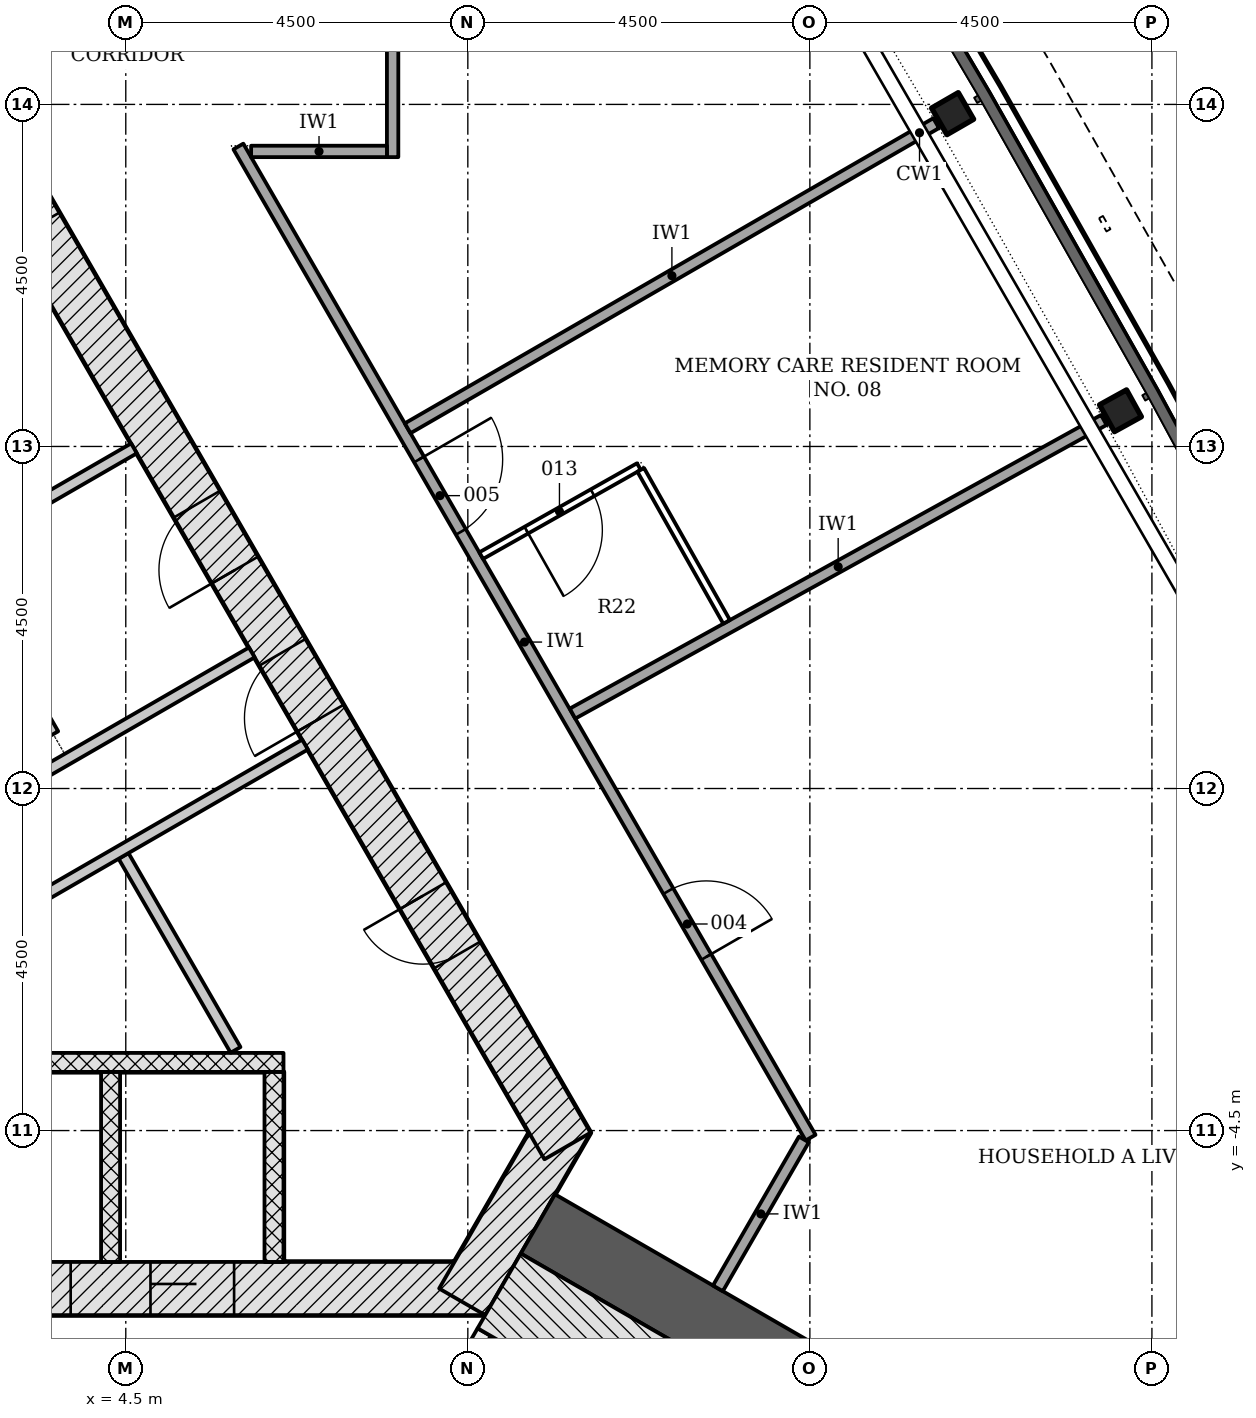
"""IFC4 building model, lengths in metres.
Left out: names, types, materials, properties, quantities, classifications, styles, units other than length and angle.
Written with IfcOpenShell. Run it as: python <this file> out.ifc"""

import sys

from ifc_helpers import new_model, si_unit, direction, frame, frame_2d, origin, origin_2d, place, context, subcontext, project, spatial, rectangle, i_section, extrude, element, fill, save


model = new_model("IFC4")
c1 = context("Model", 3, precision=1e-05, world=origin(), true_north=direction((0.0, 1.0)))
c2 = subcontext(c1, "Body", "Model", "MODEL_VIEW")
j1 = project(units=[si_unit("LENGTHUNIT", "METRE"), si_unit("PLANEANGLEUNIT", "RADIAN")], contexts=[c1])
p1 = place(None, origin())
s1 = spatial("IfcSite", under=j1, at=p1, CompositionType="ELEMENT")
p2 = place(p1, origin())
s2 = spatial("IfcBuilding", under=s1, at=p2, CompositionType="ELEMENT")
p3 = place(p2, frame((0.0, 0.0, 34.8)))
s3 = spatial("IfcBuildingStorey", under=s2, at=p3, CompositionType="ELEMENT", Elevation=34.8)
p4 = place(p3, frame((-9.229, -6.578, -0.2), z_axis=(0.0, 0.0, 1.0), x_axis=(1.0, 0.0, 0.0)))
e1 = element("IfcWall", 1, at=p4, inside=s3, PredefinedType="SHEAR", context=c2, shape_type="SweptSolid", body=[
    extrude(rectangle(XDim=18.458, YDim=0.7, at=frame_2d((9.229, 0.0))), origin(), (0.0, 0.0, 1.0), 3.6),
])
p5 = place(p4, frame((3.304, 0.0, 0.2)))
e2 = element("IfcOpeningElement", 2, at=p5, cuts=e1, PredefinedType="OPENING", context=c2, shape_type="SweptSolid", body=[
    extrude(rectangle(XDim=1.1, YDim=2.1, at=frame_2d((0.55, 1.05))), frame((0.0, 0.36, 0.0), z_axis=(0.0, -1.0, 0.0), x_axis=(1.0, 0.0, 0.0)), (0.0, 0.0, 1.0), 0.72),
])
p6 = place(p4, frame((5.454, 0.0, 0.2)))
e3 = element("IfcOpeningElement", 3, at=p6, cuts=e1, PredefinedType="OPENING", context=c2, shape_type="SweptSolid", body=[
    extrude(rectangle(XDim=1.1, YDim=2.1, at=frame_2d((0.55, 1.05))), frame((0.0, 0.36, 0.0), z_axis=(0.0, -1.0, 0.0), x_axis=(1.0, 0.0, 0.0)), (0.0, 0.0, 1.0), 0.72),
])
p7 = place(p4, frame((7.604, 0.0, 0.2)))
e4 = element("IfcOpeningElement", 4, at=p7, cuts=e1, PredefinedType="OPENING", context=c2, shape_type="SweptSolid", body=[
    extrude(rectangle(XDim=1.1, YDim=2.1, at=frame_2d((0.55, 1.05))), frame((0.0, 0.36, 0.0), z_axis=(0.0, -1.0, 0.0), x_axis=(1.0, 0.0, 0.0)), (0.0, 0.0, 1.0), 0.72),
])
p8 = place(p4, frame((9.754, 0.0, 0.2)))
e5 = element("IfcOpeningElement", 5, at=p8, cuts=e1, PredefinedType="OPENING", context=c2, shape_type="SweptSolid", body=[
    extrude(rectangle(XDim=1.1, YDim=2.1, at=frame_2d((0.55, 1.05))), frame((0.0, 0.36, 0.0), z_axis=(0.0, -1.0, 0.0), x_axis=(1.0, 0.0, 0.0)), (0.0, 0.0, 1.0), 0.72),
])
p9 = place(p4, frame((11.904, 0.0, 0.2)))
e6 = element("IfcOpeningElement", 6, at=p9, cuts=e1, PredefinedType="OPENING", context=c2, shape_type="SweptSolid", body=[
    extrude(rectangle(XDim=1.1, YDim=2.1, at=frame_2d((0.55, 1.05))), frame((0.0, 0.36, 0.0), z_axis=(0.0, -1.0, 0.0), x_axis=(1.0, 0.0, 0.0)), (0.0, 0.0, 1.0), 0.72),
])
p10 = place(p4, frame((14.054, 0.0, 0.2)))
e7 = element("IfcOpeningElement", 7, at=p10, cuts=e1, PredefinedType="OPENING", context=c2, shape_type="SweptSolid", body=[
    extrude(rectangle(XDim=1.1, YDim=2.1, at=frame_2d((0.55, 1.05))), frame((0.0, 0.36, 0.0), z_axis=(0.0, -1.0, 0.0), x_axis=(1.0, 0.0, 0.0)), (0.0, 0.0, 1.0), 0.72),
])
p11 = place(p4, frame((1.079, 0.0, 0.2)))
e8 = element("IfcOpeningElement", 8, at=p11, cuts=e1, PredefinedType="OPENING", context=c2, shape_type="SweptSolid", body=[
    extrude(rectangle(XDim=0.9, YDim=2.1, at=frame_2d((0.45, 1.05))), frame((0.0, 0.36, 0.0), z_axis=(0.0, -1.0, 0.0), x_axis=(1.0, 0.0, 0.0)), (0.0, 0.0, 1.0), 0.72),
])
p12 = place(p3, frame((8.926, -6.753, -0.2), z_axis=(0.0, 0.0, 1.0), x_axis=(0.500042739161, 0.866000726912, 0.0)))
e9 = element("IfcWall", 9, at=p12, inside=s3, PredefinedType="SHEAR", context=c2, shape_type="SweptSolid", body=[
    extrude(rectangle(XDim=2.771, YDim=0.7, at=frame_2d((1.386, 0.0))), origin(), (0.0, 0.0, 1.0), 3.6),
])
p13 = place(p3, frame((10.311, -4.703, -0.2), z_axis=(0.0, 0.0, 1.0), x_axis=(-0.500001446645, 0.866024568562, 0.0)))
e10 = element("IfcWall", 10, at=p13, inside=s3, PredefinedType="SHEAR", context=c2, shape_type="SweptSolid", body=[
    extrude(rectangle(XDim=18.458, YDim=0.7, at=frame_2d((9.229, 0.0))), origin(), (0.0, 0.0, 1.0), 3.6),
])
p14 = place(p13, frame((6.5, 0.0, 0.2)))
e11 = element("IfcOpeningElement", 11, at=p14, cuts=e10, PredefinedType="OPENING", context=c2, shape_type="SweptSolid", body=[
    extrude(rectangle(XDim=1.0, YDim=2.1, at=frame_2d((0.5, 1.05))), frame((0.0, 0.36, 0.0), z_axis=(0.0, -1.0, 0.0), x_axis=(1.0, 0.0, 0.0)), (0.0, 0.0, 1.0), 0.72),
])
p15 = place(p13, frame((2.902, 0.0, 0.2)))
e12 = element("IfcOpeningElement", 12, at=p15, cuts=e10, PredefinedType="OPENING", context=c2, shape_type="SweptSolid", body=[
    extrude(rectangle(XDim=0.9, YDim=2.1, at=frame_2d((0.45, 1.05))), frame((0.0, 0.36, 0.0), z_axis=(0.0, -1.0, 0.0), x_axis=(1.0, 0.0, 0.0)), (0.0, 0.0, 1.0), 0.72),
])
p16 = place(p13, frame((8.75, 0.0, 0.2)))
e13 = element("IfcOpeningElement", 13, at=p16, cuts=e10, PredefinedType="OPENING", context=c2, shape_type="SweptSolid", body=[
    extrude(rectangle(XDim=1.0, YDim=2.1, at=frame_2d((0.5, 1.05))), frame((0.0, 0.36, 0.0), z_axis=(0.0, -1.0, 0.0), x_axis=(1.0, 0.0, 0.0)), (0.0, 0.0, 1.0), 0.72),
])
p17 = place(p13, frame((13.977, 0.0, 0.2)))
e14 = element("IfcOpeningElement", 14, at=p17, cuts=e10, PredefinedType="OPENING", context=c2, shape_type="SweptSolid", body=[
    extrude(rectangle(XDim=0.9, YDim=2.1, at=frame_2d((0.45, 1.05))), frame((0.0, 0.36, 0.0), z_axis=(0.0, -1.0, 0.0), x_axis=(1.0, 0.0, 0.0)), (0.0, 0.0, 1.0), 0.72),
])
p18 = place(p3, frame((9.922, -5.728, -0.2), z_axis=(0.0, 0.0, 1.0), x_axis=(0.866025331845, -0.500000124603, 0.0)))
e15 = element("IfcWall", 15, at=p18, inside=s3, PredefinedType="SHEAR", context=c2, shape_type="SweptSolid", body=[
    extrude(rectangle(XDim=14.309, YDim=0.9, at=frame_2d((7.154, 0.0))), origin(), (0.0, 0.0, 1.0), 3.6),
])
for number, where, z_axis, x_axis in (
    (16, (17.586, 4.969, -0.2), (0.0, 0.0, 1.0), (-0.484, 0.875, 0.0)),
    (17, (15.378, 8.878, -0.2), (0.0, 0.0, 1.0), (-0.5, 0.866, 0.0)),
):
    element("IfcColumn", number, at=place(p3, frame(where, z_axis=z_axis, x_axis=x_axis)), inside=s3, PredefinedType="COLUMN", context=c2, shape_type="SweptSolid", body=[
        extrude(i_section(OverallWidth=0.404, OverallDepth=0.406, WebThickness=0.027, FlangeThickness=0.044, FilletRadius=0.015, at=origin_2d()), origin(), (0.0, 0.0, 1.0), 3.6),
    ])
for number, where, z_axis, x_axis in (
    (18, (4.3, -6.228, -0.2), (0.0, 0.0, 1.0), (0.0, 1.0, 0.0)),
    (19, (6.45, -6.228, -0.2), (0.0, 0.0, 1.0), (0.0, 1.0, 0.0)),
):
    element("IfcWall", number, at=place(p3, frame(where, z_axis=z_axis, x_axis=x_axis)), inside=s3, PredefinedType="PARTITIONING", context=c2, shape_type="SweptSolid", body=[
        extrude(rectangle(XDim=2.5, YDim=0.25, at=frame_2d((1.25, 0.0))), origin(), (0.0, 0.0, 1.0), 3.6),
    ])
p19 = place(p3, frame((-6.575, -3.603, 0.0), z_axis=(0.0, 0.0, 1.0), x_axis=(1.0, 0.0, 0.0)))
e20 = element("IfcWall", 20, at=p19, inside=s3, PredefinedType="PARTITIONING", context=c2, shape_type="SweptSolid", body=[
    extrude(rectangle(XDim=13.15, YDim=0.25, at=frame_2d((6.575, 0.0))), origin(), (0.0, 0.0, 1.0), 3.4),
])
p20 = place(p3, frame((-2.854, -3.413, 0.0), z_axis=(0.0, 0.0, 1.0), x_axis=(0.866030102318, 0.499991861813, 0.0)))
e21 = element("IfcWall", 21, at=p20, inside=s3, PredefinedType="PARTITIONING", context=c2, shape_type="SweptSolid", body=[
    extrude(rectangle(XDim=10.407, YDim=0.15, at=frame_2d((5.204, 0.0))), origin(), (0.0, 0.0, 1.0), 3.4),
])
p21 = place(p20, frame((3.354, 0.0, 0.0)))
e22 = element("IfcOpeningElement", 22, at=p21, cuts=e21, PredefinedType="OPENING", context=c2, shape_type="SweptSolid", body=[
    extrude(rectangle(XDim=0.9, YDim=2.1, at=frame_2d((0.45, 1.05))), frame((0.0, 0.085, 0.0), z_axis=(0.0, -1.0, 0.0), x_axis=(1.0, 0.0, 0.0)), (0.0, 0.0, 1.0), 0.17),
])
p22 = place(p3, frame((5.944, -3.439, 0.0), z_axis=(0.0, 0.0, 1.0), x_axis=(-0.499997367627, 0.86602692358, 0.0)))
e23 = element("IfcWall", 23, at=p22, inside=s3, PredefinedType="PARTITIONING", context=c2, shape_type="SweptSolid", body=[
    extrude(rectangle(XDim=2.947, YDim=0.15, at=frame_2d((1.473, 0.0))), origin(), (0.0, 0.0, 1.0), 3.4),
])
p23 = place(p3, frame((-0.054, -3.413, 0.0), z_axis=(0.0, 0.0, 1.0), x_axis=(0.866026668906, 0.499997808738, 0.0)))
e24 = element("IfcWall", 24, at=p23, inside=s3, PredefinedType="PARTITIONING", context=c2, shape_type="SweptSolid", body=[
    extrude(rectangle(XDim=7.982, YDim=0.15, at=frame_2d((3.991, 0.0))), origin(), (0.0, 0.0, 1.0), 3.4),
])
p24 = place(p23, frame((2.092, 0.0, 0.0)))
e25 = element("IfcOpeningElement", 25, at=p24, cuts=e24, PredefinedType="OPENING", context=c2, shape_type="SweptSolid", body=[
    extrude(rectangle(XDim=1.0, YDim=2.1, at=frame_2d((0.5, 1.05))), frame((0.0, 0.085, 0.0), z_axis=(0.0, -1.0, 0.0), x_axis=(1.0, 0.0, 0.0)), (0.0, 0.0, 1.0), 0.17),
])
p25 = place(p3, frame((3.546, 0.715, 0.0), z_axis=(0.0, 0.0, 1.0), x_axis=(-0.50002895357, 0.866008686788, 0.0)))
e26 = element("IfcWall", 26, at=p25, inside=s3, PredefinedType="PARTITIONING", context=c2, shape_type="SweptSolid", body=[
    extrude(rectangle(XDim=6.642, YDim=0.15, at=frame_2d((3.321, 0.0))), origin(), (0.0, 0.0, 1.0), 3.4),
])
p26 = place(p3, frame((2.248, 3.112, 0.0), z_axis=(0.0, 0.0, 1.0), x_axis=(0.866012511928, 0.500022328685, 0.0)))
e27 = element("IfcWall", 27, at=p26, inside=s3, PredefinedType="PARTITIONING", context=c2, shape_type="SweptSolid", body=[
    extrude(rectangle(XDim=2.725, YDim=0.15, at=frame_2d((1.363, 0.0))), origin(), (0.0, 0.0, 1.0), 3.4),
])
p27 = place(p3, frame((7.44, -10.226, -0.2), z_axis=(0.0, 0.0, 1.0), x_axis=(0.500022077904, 0.866012656725, 0.0)))
e28 = element("IfcWall", 28, at=p27, inside=s3, PredefinedType="SHEAR", context=c2, shape_type="SweptSolid", body=[
    extrude(rectangle(XDim=3.55, YDim=0.2, at=frame_2d((1.775, 0.0))), origin(), (0.0, 0.0, 1.0), 3.6),
])
p28 = place(p27, frame((1.175, 0.0, 0.2)))
e29 = element("IfcOpeningElement", 29, at=p28, cuts=e28, PredefinedType="OPENING", context=c2, shape_type="SweptSolid", body=[
    extrude(rectangle(XDim=1.2, YDim=2.1, at=frame_2d((0.6, 1.05))), frame((0.0, 0.11, 0.0), z_axis=(0.0, -1.0, 0.0), x_axis=(1.0, 0.0, 0.0)), (0.0, 0.0, 1.0), 0.22),
])
p29 = place(p3, frame((9.413, -6.61, -0.2), z_axis=(0.0, 0.0, 1.0), x_axis=(0.866018442252, -0.500012057535, 0.0)))
e30 = element("IfcWall", 30, at=p29, inside=s3, PredefinedType="SHEAR", context=c2, shape_type="SweptSolid", body=[
    extrude(rectangle(XDim=7.2, YDim=1.136, at=frame_2d((3.6, 0.0))), origin(), (0.0, 0.0, 1.0), 3.6),
])
p30 = place(p3, frame((5.981, 8.446, 0.0), z_axis=(0.0, 0.0, 1.0), x_axis=(0.499996620721, -0.866027354803, 0.0)))
e31 = element("IfcWall", 31, at=p30, inside=s3, PredefinedType="PARTITIONING", context=c2, shape_type="SweptSolid", body=[
    extrude(rectangle(XDim=15.057, YDim=0.15, at=frame_2d((7.528, 0.0))), origin(), (0.0, 0.0, 1.0), 2.768),
])
p31 = place(p30, frame((11.311, 0.0, 0.0)))
e32 = element("IfcOpeningElement", 32, at=p31, cuts=e31, PredefinedType="OPENING", context=c2, shape_type="SweptSolid", body=[
    extrude(rectangle(XDim=1.0, YDim=2.1, at=frame_2d((0.5, 1.05))), frame((0.0, 0.085, 0.0), z_axis=(0.0, -1.0, 0.0), x_axis=(1.0, 0.0, 0.0)), (0.0, 0.0, 1.0), 0.17),
])
p32 = place(p30, frame((4.754, 0.0, 0.0)))
e33 = element("IfcOpeningElement", 33, at=p32, cuts=e31, PredefinedType="OPENING", context=c2, shape_type="SweptSolid", body=[
    extrude(rectangle(XDim=1.1, YDim=2.1, at=frame_2d((0.55, 1.05))), frame((0.0, 0.085, 0.0), z_axis=(0.0, -1.0, 0.0), x_axis=(1.0, 0.0, 0.0)), (0.0, 0.0, 1.0), 0.17),
])
p33 = place(p3, frame((8.01, 14.256, 0.0), z_axis=(0.0, 0.0, 1.0), x_axis=(0.0, -1.0, 0.0)))
e34 = element("IfcWall", 34, at=p33, inside=s3, PredefinedType="PARTITIONING", context=c2, shape_type="SweptSolid", body=[
    extrude(rectangle(XDim=5.95, YDim=0.15, at=frame_2d((2.975, 0.0))), origin(), (0.0, 0.0, 1.0), 2.768),
])
p34 = place(p33, frame((2.225, 0.0, 0.0)))
e35 = element("IfcOpeningElement", 35, at=p34, cuts=e34, PredefinedType="OPENING", context=c2, shape_type="SweptSolid", body=[
    extrude(rectangle(XDim=1.5, YDim=2.1, at=frame_2d((0.75, 1.05))), frame((0.0, 0.085, 0.0), z_axis=(0.0, -1.0, 0.0), x_axis=(1.0, 0.0, 0.0)), (0.0, 0.0, 1.0), 0.17),
])
p35 = place(p3, frame((12.29, -6.576, 0.0), z_axis=(0.0, 0.0, 1.0), x_axis=(0.499946688677, 0.866056180903, 0.0)))
e36 = element("IfcWall", 36, at=p35, inside=s3, PredefinedType="PARTITIONING", context=c2, shape_type="SweptSolid", body=[
    extrude(rectangle(XDim=2.262, YDim=0.15, at=frame_2d((1.131, 0.0))), origin(), (0.0, 0.0, 1.0), 3.4),
])
p36 = place(p3, frame((6.149, 8.381, 0.0), z_axis=(0.0, 0.0, 1.0), x_axis=(1.0, 0.0, 0.0)))
e37 = element("IfcWall", 37, at=p36, inside=s3, PredefinedType="PARTITIONING", context=c2, shape_type="SweptSolid", body=[
    extrude(rectangle(XDim=1.787, YDim=0.15, at=frame_2d((0.894, 0.0))), origin(), (0.0, 0.0, 1.0), 2.768),
])
p37 = place(p3, frame((15.161, 8.753, 0.0), z_axis=(0.0, 0.0, 1.0), x_axis=(-0.86601695431, -0.500014634633, 0.0)))
e38 = element("IfcWall", 38, at=p37, inside=s3, PredefinedType="PARTITIONING", context=c2, shape_type="SweptSolid", body=[
    extrude(rectangle(XDim=8.029, YDim=0.15, at=frame_2d((4.014, 0.0))), origin(), (0.0, 0.0, 1.0), 2.768),
])
p38 = place(p3, frame((17.367, 4.848, 0.0), z_axis=(0.0, 0.0, 1.0), x_axis=(-0.875233702412, -0.483700285469, 0.0)))
e39 = element("IfcWall", 39, at=p38, inside=s3, PredefinedType="PARTITIONING", context=c2, shape_type="SweptSolid", body=[
    extrude(rectangle(XDim=7.986, YDim=0.15, at=frame_2d((3.993, 0.0))), origin(), (0.0, 0.0, 1.0), 2.768),
])
p39 = place(p3, frame((11.25, 4.235, 0.0), z_axis=(0.0, 0.0, 1.0), x_axis=(-0.870673532045, -0.491861363188, 0.0)))
e40 = element("IfcWall", 40, at=p39, inside=s3, PredefinedType="PARTITIONING", context=c2, shape_type="SweptSolid", body=[
    extrude(rectangle(XDim=2.382, YDim=0.1, at=frame_2d((1.191, 0.0))), origin(), (0.0, 0.0, 1.0), 3.4),
])
p40 = place(p39, frame((0.7, 0.0, 0.0)))
e41 = element("IfcOpeningElement", 41, at=p40, cuts=e40, PredefinedType="OPENING", context=c2, shape_type="SweptSolid", body=[
    extrude(rectangle(XDim=1.0, YDim=2.1, at=frame_2d((0.5, 1.05))), frame((0.0, 0.06, 0.0), z_axis=(0.0, -1.0, 0.0), x_axis=(1.0, 0.0, 0.0)), (0.0, 0.0, 1.0), 0.12),
])
p41 = place(p3, frame((12.405, 2.192, 0.0), z_axis=(0.0, 0.0, 1.0), x_axis=(-0.491840077016, 0.870685556697, 0.0)))
e42 = element("IfcWall", 42, at=p41, inside=s3, PredefinedType="PARTITIONING", context=c2, shape_type="SweptSolid", body=[
    extrude(rectangle(XDim=2.297, YDim=0.1, at=frame_2d((1.148, 0.0))), origin(), (0.0, 0.0, 1.0), 2.768),
])
p42 = place(p9, origin())
e43 = element("IfcDoor", 43, at=p42, inside=s3, OperationType="DOUBLE_DOOR_SLIDING", PredefinedType="DOOR", context=c2, shape_type="SweptSolid", body=[
    extrude(rectangle(XDim=1.1, YDim=2.1, at=frame_2d((0.55, 1.05))), frame((0.0, 0.025, 0.0), z_axis=(0.0, -1.0, 0.0), x_axis=(1.0, 0.0, 0.0)), (0.0, 0.0, 1.0), 0.05),
])
fill(e6, e43)
p43 = place(p10, origin())
e44 = element("IfcDoor", 44, at=p43, inside=s3, OperationType="DOUBLE_DOOR_SLIDING", PredefinedType="DOOR", context=c2, shape_type="SweptSolid", body=[
    extrude(rectangle(XDim=1.1, YDim=2.1, at=frame_2d((0.55, 1.05))), frame((0.0, 0.025, 0.0), z_axis=(0.0, -1.0, 0.0), x_axis=(1.0, 0.0, 0.0)), (0.0, 0.0, 1.0), 0.05),
])
fill(e7, e44)
p44 = place(p14, origin())
e45 = element("IfcDoor", 45, at=p44, inside=s3, OperationType="SINGLE_SWING_LEFT", PredefinedType="DOOR", context=c2, shape_type="SweptSolid", body=[
    extrude(rectangle(XDim=1.0, YDim=2.1, at=frame_2d((0.5, 1.05))), frame((0.0, 0.075, 0.0), z_axis=(0.0, -1.0, 0.0), x_axis=(1.0, 0.0, 0.0)), (0.0, 0.0, 1.0), 0.15),
])
fill(e11, e45)
p45 = place(p15, origin())
e46 = element("IfcDoor", 46, at=p45, inside=s3, OperationType="SINGLE_SWING_RIGHT", PredefinedType="DOOR", context=c2, shape_type="SweptSolid", body=[
    extrude(rectangle(XDim=0.9, YDim=2.1, at=frame_2d((0.45, 1.05))), frame((0.0, 0.075, 0.0), z_axis=(0.0, -1.0, 0.0), x_axis=(1.0, 0.0, 0.0)), (0.0, 0.0, 1.0), 0.15),
])
fill(e12, e46)
p46 = place(p16, origin())
e47 = element("IfcDoor", 47, at=p46, inside=s3, OperationType="SINGLE_SWING_LEFT", PredefinedType="DOOR", context=c2, shape_type="SweptSolid", body=[
    extrude(rectangle(XDim=1.0, YDim=2.1, at=frame_2d((0.5, 1.05))), frame((0.0, 0.075, 0.0), z_axis=(0.0, -1.0, 0.0), x_axis=(1.0, 0.0, 0.0)), (0.0, 0.0, 1.0), 0.15),
])
fill(e13, e47)
p47 = place(p31, origin())
e48 = element("IfcDoor", 48, at=p47, inside=s3, OperationType="SINGLE_SWING_RIGHT", PredefinedType="DOOR", context=c2, shape_type="SweptSolid", body=[
    extrude(rectangle(XDim=1.0, YDim=2.1, at=frame_2d((0.5, 1.05))), frame((0.0, 0.025, 0.0), z_axis=(0.0, -1.0, 0.0), x_axis=(1.0, 0.0, 0.0)), (0.0, 0.0, 1.0), 0.05),
])
fill(e32, e48)
p48 = place(p32, origin())
e49 = element("IfcDoor", 49, at=p48, inside=s3, OperationType="SINGLE_SWING_LEFT", PredefinedType="DOOR", context=c2, shape_type="SweptSolid", body=[
    extrude(rectangle(XDim=1.1, YDim=2.1, at=frame_2d((0.55, 1.05))), frame((0.0, 0.025, 0.0), z_axis=(0.0, -1.0, 0.0), x_axis=(1.0, 0.0, 0.0)), (0.0, 0.0, 1.0), 0.05),
])
fill(e33, e49)
p49 = place(p40, origin())
e50 = element("IfcDoor", 50, at=p49, inside=s3, OperationType="SINGLE_SWING_RIGHT", PredefinedType="DOOR", context=c2, shape_type="SweptSolid", body=[
    extrude(rectangle(XDim=1.0, YDim=2.1, at=frame_2d((0.5, 1.05))), frame((0.0, 0.025, 0.0), z_axis=(0.0, -1.0, 0.0), x_axis=(1.0, 0.0, 0.0)), (0.0, 0.0, 1.0), 0.05),
])
fill(e41, e50)
save(model, sys.argv[1])
